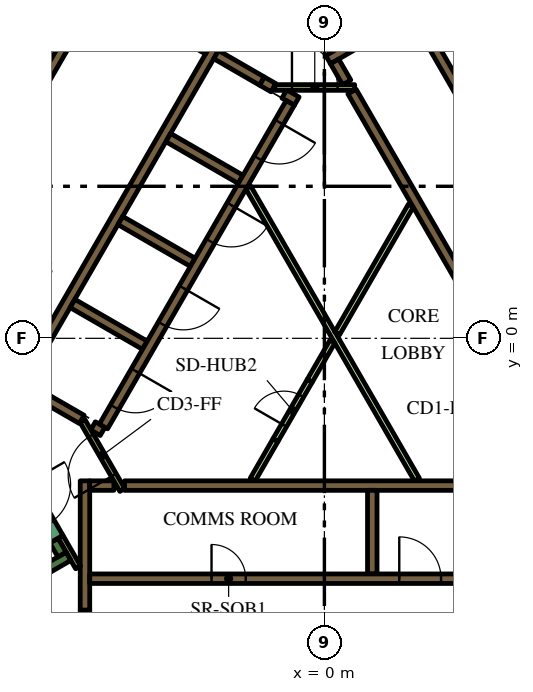
"""IFC4 building model, lengths in metres.
Left out: names, types, materials, properties, quantities, classifications, styles, units other than length and angle.
Written with IfcOpenShell. Run it as: python <this file> out.ifc"""

import sys

from ifc_helpers import new_model, si_unit, direction, frame, frame_2d, origin, place, context, subcontext, project, spatial, polyline, rectangle, outline, extrude, element, fill, save


model = new_model("IFC4")
c1 = context("Model", 3, precision=1e-05, world=origin(), true_north=direction((0.0, 1.0)))
c2 = subcontext(c1, "Body", "Model", "MODEL_VIEW")
j1 = project(units=[si_unit("LENGTHUNIT", "METRE"), si_unit("PLANEANGLEUNIT", "RADIAN")], contexts=[c1])
p1 = place(None, origin())
s1 = spatial("IfcSite", under=j1, at=p1, CompositionType="ELEMENT")
p2 = place(p1, origin())
s2 = spatial("IfcBuilding", under=s1, at=p2, CompositionType="ELEMENT")
p3 = place(p2, frame((0.0, 0.0, 43.2)))
s3 = spatial("IfcBuildingStorey", under=s2, at=p3, CompositionType="ELEMENT", Elevation=43.2)
p4 = place(p3, frame((-15.36, -1.503, 0.0), z_axis=(0.0, 0.0, 1.0), x_axis=(0.50000389221, 0.866023156604, 0.0)))
e1 = element("IfcWall", 1, at=p4, inside=s3, PredefinedType="SOLIDWALL", context=c2, shape_type="SweptSolid", body=[
    extrude(rectangle(XDim=21.0, YDim=0.9, at=frame_2d((10.5, 0.0))), origin(), (0.0, 0.0, 1.0), 3.9),
])
p5 = place(p3, frame((-12.84, -9.261, 0.0), z_axis=(0.0, 0.0, 1.0), x_axis=(0.866016039709, 0.500016218704, 0.0)))
e2 = element("IfcWall", 2, at=p5, inside=s3, PredefinedType="SOLIDWALL", context=c2, shape_type="SweptSolid", body=[
    extrude(rectangle(XDim=7.05, YDim=0.25, at=frame_2d((3.525, 0.0))), origin(), (0.0, 0.0, 1.0), 3.9),
])
p6 = place(p3, frame((-6.905, -5.69, 0.0), z_axis=(0.0, 0.0, 1.0), x_axis=(-0.500402024738, 0.865793170242, 0.0)))
e3 = element("IfcWall", 3, at=p6, inside=s3, PredefinedType="SOLIDWALL", context=c2, shape_type="SweptSolid", body=[
    extrude(rectangle(XDim=0.425, YDim=0.25, at=frame_2d((0.212, 0.0))), origin(), (0.0, 0.0, 1.0), 3.9),
])
p7 = place(p3, frame((-5.259, -3.875, 0.0), z_axis=(0.0, 0.0, 1.0), x_axis=(1.0, 0.0, 0.0)))
e4 = element("IfcWall", 4, at=p7, inside=s3, PredefinedType="SOLIDWALL", context=c2, shape_type="SweptSolid", body=[
    extrude(rectangle(XDim=10.489, YDim=0.25, at=frame_2d((5.244, 0.0))), origin(), (0.0, 0.0, 1.0), 3.9),
])
p8 = place(p3, frame((1.26, -4.0, 0.0), z_axis=(0.0, 0.0, 1.0), x_axis=(0.0, -1.0, 0.0)))
e5 = element("IfcWall", 5, at=p8, inside=s3, PredefinedType="SOLIDWALL", context=c2, shape_type="SweptSolid", body=[
    extrude(rectangle(XDim=2.2, YDim=0.25, at=frame_2d((1.1, 0.0))), origin(), (0.0, 0.0, 1.0), 3.9),
])
p9 = place(p3, frame((-6.3, -3.75, 0.0), z_axis=(0.0, 0.0, 1.0), x_axis=(0.0, -1.0, 0.0)))
e6 = element("IfcWall", 6, at=p9, inside=s3, PredefinedType="SOLIDWALL", context=c2, shape_type="SweptSolid", body=[
    extrude(rectangle(XDim=3.404, YDim=0.25, at=frame_2d((1.702, 0.0))), origin(), (0.0, 0.0, 1.0), 3.9),
])
p10 = place(p3, frame((-6.175, -3.875, 0.0), z_axis=(0.0, 0.0, 1.0), x_axis=(1.0, 0.0, 0.0)))
e7 = element("IfcWall", 7, at=p10, inside=s3, PredefinedType="SOLIDWALL", context=c2, shape_type="SweptSolid", body=[
    extrude(rectangle(XDim=0.637, YDim=0.25, at=frame_2d((0.318, 0.0))), origin(), (0.0, 0.0, 1.0), 3.9),
])
p11 = place(p3, origin())
e8 = element("IfcWall", 8, at=p11, inside=s3, PredefinedType="SOLIDWALL", context=c2, shape_type="SweptSolid", body=[
    extrude(outline(polyline([(2.776, 8.733), (2.499, 8.573), (2.498, 8.573), (2.498, 8.573), (2.282, 8.448), (2.282, 8.448), (0.377, 7.348), (0.16, 7.223), (0.035, 7.439), (3.032, 9.169), (3.03, 9.152), (3.03, 9.133), (3.031, 9.113), (3.035, 9.094), (3.04, 9.075), (3.047, 9.057), (3.056, 9.039), (3.119, 8.931), (2.776, 8.733)])), origin(), (0.0, 0.0, 1.0), 3.9),
])
p12 = place(p3, frame((0.268, 7.285, 0.0), z_axis=(0.0, 0.0, 1.0), x_axis=(0.500098681536, -0.865968422476, 0.0)))
e9 = element("IfcWall", 9, at=p12, inside=s3, PredefinedType="SOLIDWALL", context=c2, shape_type="SweptSolid", body=[
    extrude(rectangle(XDim=0.636, YDim=0.25, at=frame_2d((0.318, 0.0))), origin(), (0.0, 0.0, 1.0), 3.9),
])
p13 = place(p3, frame((5.97, -2.591, 0.0), z_axis=(0.0, 0.0, 1.0), x_axis=(-0.499994469932, 0.866028596547, 0.0)))
e10 = element("IfcWall", 10, at=p13, inside=s3, PredefinedType="SOLIDWALL", context=c2, shape_type="SweptSolid", body=[
    extrude(rectangle(XDim=10.488, YDim=0.25, at=frame_2d((5.244, 0.0))), origin(), (0.0, 0.0, 1.0), 3.9),
])
p14 = place(p3, frame((-8.06, -1.311, 0.0), z_axis=(0.0, 0.0, 1.0), x_axis=(0.50000273126, 0.866023826885, 0.0)))
e11 = element("IfcWall", 11, at=p14, inside=s3, PredefinedType="SOLIDWALL", context=c2, shape_type="SweptSolid", body=[
    extrude(rectangle(XDim=10.33, YDim=0.25, at=frame_2d((5.165, 0.0))), origin(), (0.0, 0.0, 1.0), 3.9),
])
p15 = place(p3, frame((-1.342, 6.595, 0.0), z_axis=(0.0, 0.0, 1.0), x_axis=(-0.866046247233, 0.49996389635, 0.0)))
e12 = element("IfcWall", 12, at=p15, inside=s3, PredefinedType="SOLIDWALL", context=c2, shape_type="SweptSolid", body=[
    extrude(rectangle(XDim=0.35, YDim=0.25, at=frame_2d((0.175, 0.0))), origin(), (0.0, 0.0, 1.0), 3.9),
])
p16 = place(p3, frame((-1.647, 6.771, 0.0), z_axis=(0.0, 0.0, 1.0), x_axis=(-0.865971728693, 0.500092956464, 0.0)))
e13 = element("IfcWall", 13, at=p16, inside=s3, PredefinedType="SOLIDWALL", context=c2, shape_type="SweptSolid", body=[
    extrude(rectangle(XDim=1.388, YDim=0.25, at=frame_2d((0.694, 0.0))), origin(), (0.0, 0.0, 1.0), 3.9),
])
p17 = place(p3, frame((-0.728, 6.24, 0.0), z_axis=(0.0, 0.0, 1.0), x_axis=(-0.866088799389, 0.499890179513, 0.0)))
e14 = element("IfcWall", 14, at=p17, inside=s3, PredefinedType="SOLIDWALL", context=c2, shape_type="SweptSolid", body=[
    extrude(rectangle(XDim=0.378, YDim=0.25, at=frame_2d((0.189, 0.0))), origin(), (0.0, 0.0, 1.0), 3.9),
])
for number, where, z_axis, x_axis in (
    (15, (-2.204, 4.182, 0.0), (0.0, 0.0, 1.0), (-0.866, 0.5, 0.0)),
    (16, (-5.369, 3.1, 0.0), (0.0, 0.0, 1.0), (0.866, -0.5, 0.0)),
    (17, (-4.724, -0.182, 0.0), (0.0, 0.0, 1.0), (-0.866, 0.5, 0.0)),
):
    element("IfcWall", number, at=place(p3, frame(where, z_axis=z_axis, x_axis=x_axis)), inside=s3, PredefinedType="SOLIDWALL", context=c2, shape_type="SweptSolid", body=[
        extrude(rectangle(XDim=2.2, YDim=0.25, at=frame_2d((1.1, 0.0))), origin(), (0.0, 0.0, 1.0), 3.9),
    ])
p18 = place(p3, frame((-6.088, -2.305, 0.0), z_axis=(0.0, 0.0, 1.0), x_axis=(0.866059450854, -0.499941024108, 0.0)))
e18 = element("IfcWall", 18, at=p18, inside=s3, PredefinedType="SOLIDWALL", context=c2, shape_type="SweptSolid", body=[
    extrude(rectangle(XDim=0.29, YDim=0.25, at=frame_2d((0.145, 0.0))), origin(), (0.0, 0.0, 1.0), 3.9),
])
p19 = place(p3, frame((-7.889, -1.265, 0.0), z_axis=(0.0, 0.0, 1.0), x_axis=(0.865986741702, -0.500066958712, 0.0)))
e19 = element("IfcWall", 19, at=p19, inside=s3, PredefinedType="SOLIDWALL", context=c2, shape_type="SweptSolid", body=[
    extrude(rectangle(XDim=1.738, YDim=0.25, at=frame_2d((0.869, 0.0))), origin(), (0.0, 0.0, 1.0), 3.9),
])
e20 = element("IfcWall", 20, at=p11, inside=s3, PredefinedType="SOLIDWALL", context=c2, shape_type="SweptSolid", body=[
    extrude(outline(polyline([(-3.128, 7.481), (-3.259, 7.557), (-3.134, 7.773), (-3.003, 7.698), (-3.128, 7.481)])), origin(), (0.0, 0.0, 1.0), 3.9),
])
p20 = place(p3, frame((-6.48, -6.027, 0.0), z_axis=(0.0, 0.0, 1.0), x_axis=(-0.499927229454, 0.866067413802, 0.0)))
e21 = element("IfcWall", 21, at=p20, inside=s3, PredefinedType="PARTITIONING", context=c2, shape_type="SweptSolid", body=[
    extrude(rectangle(XDim=0.929, YDim=0.15, at=frame_2d((0.464, 0.0))), origin(), (0.0, 0.0, 1.0), 3.9),
])
p21 = place(p3, frame((-1.887, -3.718, 0.0), z_axis=(0.0, 0.0, 1.0), x_axis=(0.500057179532, 0.865992388649, 0.0)))
e22 = element("IfcWall", 22, at=p21, inside=s3, PredefinedType="PARTITIONING", context=c2, shape_type="SweptSolid", body=[
    extrude(rectangle(XDim=1.199, YDim=0.15, at=frame_2d((0.6, 0.0))), origin(), (0.0, 0.0, 1.0), 2.75),
])
p22 = place(p3, frame((2.435, -3.718, 0.0), z_axis=(0.0, 0.0, 1.0), x_axis=(-0.499985176046, 0.866033962229, 0.0)))
e23 = element("IfcWall", 23, at=p22, inside=s3, PredefinedType="PARTITIONING", context=c2, shape_type="SweptSolid", body=[
    extrude(rectangle(XDim=8.875, YDim=0.15, at=frame_2d((4.438, 0.0))), origin(), (0.0, 0.0, 1.0), 2.75),
])
p23 = place(p3, frame((0.336, 0.132, 0.0), z_axis=(0.0, 0.0, 1.0), x_axis=(0.500001957507, 0.866024273614, 0.0)))
e24 = element("IfcWall", 24, at=p23, inside=s3, PredefinedType="PARTITIONING", context=c2, shape_type="SweptSolid", body=[
    extrude(rectangle(XDim=3.881, YDim=0.15, at=frame_2d((1.941, 0.0))), origin(), (0.0, 0.0, 1.0), 2.75),
])
p24 = place(p3, frame((-0.387, -1.121, 0.0), z_axis=(0.0, 0.0, 1.0), x_axis=(0.500057179532, 0.865992388649, 0.0)))
e25 = element("IfcWall", 25, at=p24, inside=s3, PredefinedType="PARTITIONING", context=c2, shape_type="SweptSolid", body=[
    extrude(rectangle(XDim=1.199, YDim=0.15, at=frame_2d((0.6, 0.0))), origin(), (0.0, 0.0, 1.0), 2.75),
])
p25 = place(p3, frame((-6.175, -6.325, 0.0), z_axis=(0.0, 0.0, 1.0), x_axis=(1.0, 0.0, 0.0)))
e26 = element("IfcWall", 26, at=p25, inside=s3, PredefinedType="SOLIDWALL", context=c2, shape_type="SweptSolid", body=[
    extrude(rectangle(XDim=12.35, YDim=0.25, at=frame_2d((6.175, 0.0))), origin(), (0.0, 0.0, 1.0), 3.9),
])
p26 = place(p25, frame((3.205, 0.0, 0.0)))
e27 = element("IfcOpeningElement", 27, at=p26, cuts=e26, PredefinedType="OPENING", context=c2, shape_type="SweptSolid", body=[
    extrude(rectangle(XDim=0.9, YDim=2.1, at=frame_2d((0.45, 1.05))), frame((0.0, 0.135, 0.0), z_axis=(0.0, -1.0, 0.0), x_axis=(1.0, 0.0, 0.0)), (0.0, 0.0, 1.0), 0.27),
])
p27 = place(p25, frame((8.145, 0.0, 0.0)))
e28 = element("IfcOpeningElement", 28, at=p27, cuts=e26, PredefinedType="OPENING", context=c2, shape_type="SweptSolid", body=[
    extrude(rectangle(XDim=1.1, YDim=2.1, at=frame_2d((0.55, 1.05))), frame((0.0, 0.135, 0.0), z_axis=(0.0, -1.0, 0.0), x_axis=(1.0, 0.0, 0.0)), (0.0, 0.0, 1.0), 0.27),
])
p28 = place(p25, frame((10.665, 0.0, 0.0)))
e29 = element("IfcOpeningElement", 29, at=p28, cuts=e26, PredefinedType="OPENING", context=c2, shape_type="SweptSolid", body=[
    extrude(rectangle(XDim=1.1, YDim=2.1, at=frame_2d((0.55, 1.05))), frame((0.0, 0.135, 0.0), z_axis=(0.0, -1.0, 0.0), x_axis=(1.0, 0.0, 0.0)), (0.0, 0.0, 1.0), 0.27),
])
p29 = place(p3, frame((8.565, -2.185, 0.0), z_axis=(0.0, 0.0, 1.0), x_axis=(-0.499997954832, 0.866026584559, 0.0)))
e30 = element("IfcWall", 30, at=p29, inside=s3, PredefinedType="SOLIDWALL", context=c2, shape_type="SweptSolid", body=[
    extrude(rectangle(XDim=12.35, YDim=0.25, at=frame_2d((6.175, 0.0))), origin(), (0.0, 0.0, 1.0), 3.9),
])
p30 = place(p29, frame((5.725, 0.0, 0.0)))
e31 = element("IfcOpeningElement", 31, at=p30, cuts=e30, PredefinedType="OPENING", context=c2, shape_type="SweptSolid", body=[
    extrude(rectangle(XDim=0.9, YDim=2.1, at=frame_2d((0.45, 1.05))), frame((0.0, 0.135, 0.0), z_axis=(0.0, -1.0, 0.0), x_axis=(1.0, 0.0, 0.0)), (0.0, 0.0, 1.0), 0.27),
])
p31 = place(p3, frame((-6.008, 9.144, 0.0), z_axis=(0.0, 0.0, 1.0), x_axis=(-0.500006956611, -0.866021387346, 0.0)))
e32 = element("IfcWall", 32, at=p31, inside=s3, PredefinedType="SOLIDWALL", context=c2, shape_type="SweptSolid", body=[
    extrude(rectangle(XDim=9.83, YDim=0.25, at=frame_2d((4.915, 0.0))), origin(), (0.0, 0.0, 1.0), 3.9),
])
p32 = place(p31, frame((6.985, 0.0, 0.0)))
e33 = element("IfcOpeningElement", 33, at=p32, cuts=e32, PredefinedType="OPENING", context=c2, shape_type="SweptSolid", body=[
    extrude(rectangle(XDim=0.9, YDim=2.1, at=frame_2d((0.45, 1.05))), frame((0.0, 0.135, 0.0), z_axis=(0.0, -1.0, 0.0), x_axis=(1.0, 0.0, 0.0)), (0.0, 0.0, 1.0), 0.27),
])
p33 = place(p3, frame((-0.898, 6.194, 0.0), z_axis=(0.0, 0.0, 1.0), x_axis=(-0.499996202215, -0.866027596426, 0.0)))
e34 = element("IfcWall", 34, at=p33, inside=s3, PredefinedType="SOLIDWALL", context=c2, shape_type="SweptSolid", body=[
    extrude(rectangle(XDim=9.83, YDim=0.25, at=frame_2d((4.915, 0.0))), origin(), (0.0, 0.0, 1.0), 3.9),
])
p34 = place(p33, frame((0.585, 0.0, 0.0)))
e35 = element("IfcOpeningElement", 35, at=p34, cuts=e34, PredefinedType="OPENING", context=c2, shape_type="SweptSolid", body=[
    extrude(rectangle(XDim=1.1, YDim=2.1, at=frame_2d((0.55, 1.05))), frame((0.0, 0.135, 0.0), z_axis=(0.0, -1.0, 0.0), x_axis=(1.0, 0.0, 0.0)), (0.0, 0.0, 1.0), 0.27),
])
p35 = place(p33, frame((3.105, 0.0, 0.0)))
e36 = element("IfcOpeningElement", 36, at=p35, cuts=e34, PredefinedType="OPENING", context=c2, shape_type="SweptSolid", body=[
    extrude(rectangle(XDim=1.1, YDim=2.1, at=frame_2d((0.55, 1.05))), frame((0.0, 0.135, 0.0), z_axis=(0.0, -1.0, 0.0), x_axis=(1.0, 0.0, 0.0)), (0.0, 0.0, 1.0), 0.27),
])
p36 = place(p33, frame((5.625, 0.0, 0.0)))
e37 = element("IfcOpeningElement", 37, at=p36, cuts=e34, PredefinedType="OPENING", context=c2, shape_type="SweptSolid", body=[
    extrude(rectangle(XDim=1.1, YDim=2.1, at=frame_2d((0.55, 1.05))), frame((0.0, 0.135, 0.0), z_axis=(0.0, -1.0, 0.0), x_axis=(1.0, 0.0, 0.0)), (0.0, 0.0, 1.0), 0.27),
])
p37 = place(p33, frame((8.145, 0.0, 0.0)))
e38 = element("IfcOpeningElement", 38, at=p37, cuts=e34, PredefinedType="OPENING", context=c2, shape_type="SweptSolid", body=[
    extrude(rectangle(XDim=1.1, YDim=2.1, at=frame_2d((0.55, 1.05))), frame((0.0, 0.135, 0.0), z_axis=(0.0, -1.0, 0.0), x_axis=(1.0, 0.0, 0.0)), (0.0, 0.0, 1.0), 0.27),
])
p38 = place(p3, frame((-8.103, -3.466, 0.0), z_axis=(0.0, 0.0, 1.0), x_axis=(0.500078061341, -0.865980330357, 0.0)))
e39 = element("IfcWall", 39, at=p38, inside=s3, PredefinedType="SOLIDWALL", context=c2, shape_type="SweptSolid", body=[
    extrude(rectangle(XDim=2.1, YDim=0.4, at=frame_2d((1.05, 0.0))), origin(), (0.0, 0.0, 1.0), 3.9),
])
p39 = place(p38, frame((0.45, 0.0, 0.0)))
e40 = element("IfcOpeningElement", 40, at=p39, cuts=e39, PredefinedType="OPENING", context=c2, shape_type="SweptSolid", body=[
    extrude(rectangle(XDim=1.2, YDim=2.1, at=frame_2d((0.6, 1.05))), frame((0.0, 0.21, 0.0), z_axis=(0.0, -1.0, 0.0), x_axis=(1.0, 0.0, 0.0)), (0.0, 0.0, 1.0), 0.42),
])
p40 = place(p3, frame((-6.3, -7.154, 0.0), z_axis=(0.0, 0.0, 1.0), x_axis=(0.0, -1.0, 0.0)))
e41 = element("IfcWall", 41, at=p40, inside=s3, PredefinedType="SOLIDWALL", context=c2, shape_type="SweptSolid", body=[
    extrude(rectangle(XDim=1.8, YDim=0.25, at=frame_2d((0.9, 0.0))), origin(), (0.0, 0.0, 1.0), 3.9),
])
p41 = place(p40, frame((0.45, 0.0, 0.0)))
e42 = element("IfcOpeningElement", 42, at=p41, cuts=e41, PredefinedType="OPENING", context=c2, shape_type="SweptSolid", body=[
    extrude(rectangle(XDim=0.9, YDim=2.1, at=frame_2d((0.45, 1.05))), frame((0.0, 0.135, 0.0), z_axis=(0.0, -1.0, 0.0), x_axis=(1.0, 0.0, 0.0)), (0.0, 0.0, 1.0), 0.27),
])
p42 = place(p3, frame((-1.303, 6.6, 0.0), z_axis=(0.0, 0.0, 1.0), x_axis=(1.0, 0.0, 0.0)))
e43 = element("IfcWall", 43, at=p42, inside=s3, PredefinedType="PARTITIONING", context=c2, shape_type="SweptSolid", body=[
    extrude(rectangle(XDim=2.1, YDim=0.15, at=frame_2d((1.05, 0.0))), origin(), (0.0, 0.0, 1.0), 3.9),
])
p43 = place(p42, frame((0.45, 0.0, 0.0)))
e44 = element("IfcOpeningElement", 44, at=p43, cuts=e43, PredefinedType="OPENING", context=c2, shape_type="SweptSolid", body=[
    extrude(rectangle(XDim=1.2, YDim=2.1, at=frame_2d((0.6, 1.05))), frame((0.0, 0.085, 0.0), z_axis=(0.0, -1.0, 0.0), x_axis=(1.0, 0.0, 0.0)), (0.0, 0.0, 1.0), 0.17),
])
p44 = place(p3, frame((-5.317, -3.99, 0.0), z_axis=(0.0, 0.0, 1.0), x_axis=(-0.500027713859, 0.866009402589, 0.0)))
e45 = element("IfcWall", 45, at=p44, inside=s3, PredefinedType="PARTITIONING", context=c2, shape_type="SweptSolid", body=[
    extrude(rectangle(XDim=2.1, YDim=0.15, at=frame_2d((1.05, 0.0))), origin(), (0.0, 0.0, 1.0), 3.9),
])
p45 = place(p44, frame((0.45, 0.0, 0.0)))
e46 = element("IfcOpeningElement", 46, at=p45, cuts=e45, PredefinedType="OPENING", context=c2, shape_type="SweptSolid", body=[
    extrude(rectangle(XDim=1.2, YDim=2.1, at=frame_2d((0.6, 1.05))), frame((0.0, 0.085, 0.0), z_axis=(0.0, -1.0, 0.0), x_axis=(1.0, 0.0, 0.0)), (0.0, 0.0, 1.0), 0.17),
])
p46 = place(p3, frame((-1.287, -2.679, 0.0), z_axis=(0.0, 0.0, 1.0), x_axis=(0.499961193289, 0.866047807691, 0.0)))
e47 = element("IfcWall", 47, at=p46, inside=s3, PredefinedType="PARTITIONING", context=c2, shape_type="SweptSolid", body=[
    extrude(rectangle(XDim=1.8, YDim=0.15, at=frame_2d((0.9, 0.0))), origin(), (0.0, 0.0, 1.0), 2.75),
])
p47 = place(p46, frame((0.45, 0.0, 0.0)))
e48 = element("IfcOpeningElement", 48, at=p47, cuts=e47, PredefinedType="OPENING", context=c2, shape_type="SweptSolid", body=[
    extrude(rectangle(XDim=0.9, YDim=2.1, at=frame_2d((0.45, 1.05))), frame((0.0, 0.085, 0.0), z_axis=(0.0, -1.0, 0.0), x_axis=(1.0, 0.0, 0.0)), (0.0, 0.0, 1.0), 0.17),
])
p48 = place(p3, frame((-19.081, -3.9, 0.0), z_axis=(0.0, 0.0, 1.0), x_axis=(0.499998313975, 0.866026377209, 0.0)))
e49 = element("IfcWall", 49, at=p48, inside=s3, PredefinedType="PARTITIONING", context=c2, shape_type="SweptSolid", body=[
    extrude(rectangle(XDim=25.766, YDim=0.15, at=frame_2d((12.883, 0.0))), origin(), (0.0, 0.0, 1.0), 2.75),
])
p49 = place(p48, frame((16.196, 0.0, 0.0)))
e50 = element("IfcOpeningElement", 50, at=p49, cuts=e49, PredefinedType="OPENING", context=c2, shape_type="SweptSolid", body=[
    extrude(rectangle(XDim=1.0, YDim=2.1, at=frame_2d((0.5, 1.05))), frame((0.0, 0.085, 0.0), z_axis=(0.0, -1.0, 0.0), x_axis=(1.0, 0.0, 0.0)), (0.0, 0.0, 1.0), 0.17),
])
p50 = place(p48, frame((14.889, 0.0, 0.0)))
e51 = element("IfcOpeningElement", 51, at=p50, cuts=e49, PredefinedType="OPENING", context=c2, shape_type="SweptSolid", body=[
    extrude(rectangle(XDim=1.0, YDim=2.1, at=frame_2d((0.5, 1.05))), frame((0.0, 0.085, 0.0), z_axis=(0.0, -1.0, 0.0), x_axis=(1.0, 0.0, 0.0)), (0.0, 0.0, 1.0), 0.17),
])
p51 = place(p48, frame((3.698, 0.0, 0.0)))
e52 = element("IfcOpeningElement", 52, at=p51, cuts=e49, PredefinedType="OPENING", context=c2, shape_type="SweptSolid", body=[
    extrude(rectangle(XDim=1.1, YDim=2.1, at=frame_2d((0.55, 1.05))), frame((0.0, 0.085, 0.0), z_axis=(0.0, -1.0, 0.0), x_axis=(1.0, 0.0, 0.0)), (0.0, 0.0, 1.0), 0.17),
])
p52 = place(p48, frame((2.392, 0.0, 0.0)))
e53 = element("IfcOpeningElement", 53, at=p52, cuts=e49, PredefinedType="OPENING", context=c2, shape_type="SweptSolid", body=[
    extrude(rectangle(XDim=1.0, YDim=2.1, at=frame_2d((0.5, 1.05))), frame((0.0, 0.085, 0.0), z_axis=(0.0, -1.0, 0.0), x_axis=(1.0, 0.0, 0.0)), (0.0, 0.0, 1.0), 0.17),
])
p53 = place(p26, origin())
e54 = element("IfcDoor", 54, at=p53, inside=s3, OperationType="SINGLE_SWING_LEFT", PredefinedType="DOOR", context=c2, shape_type="SweptSolid", body=[
    extrude(rectangle(XDim=0.9, YDim=2.1, at=frame_2d((0.45, 1.05))), frame((0.0, 0.025, 0.0), z_axis=(0.0, -1.0, 0.0), x_axis=(1.0, 0.0, 0.0)), (0.0, 0.0, 1.0), 0.05),
])
fill(e27, e54)
p54 = place(p27, origin())
e55 = element("IfcDoor", 55, at=p54, inside=s3, OperationType="DOUBLE_DOOR_SLIDING", PredefinedType="DOOR", context=c2, shape_type="SweptSolid", body=[
    extrude(rectangle(XDim=1.1, YDim=2.1, at=frame_2d((0.55, 1.05))), frame((0.0, 0.025, 0.0), z_axis=(0.0, -1.0, 0.0), x_axis=(1.0, 0.0, 0.0)), (0.0, 0.0, 1.0), 0.05),
])
fill(e28, e55)
p55 = place(p34, origin())
e56 = element("IfcDoor", 56, at=p55, inside=s3, OperationType="DOUBLE_DOOR_SLIDING", PredefinedType="DOOR", context=c2, shape_type="SweptSolid", body=[
    extrude(rectangle(XDim=1.1, YDim=2.1, at=frame_2d((0.55, 1.05))), frame((0.0, 0.025, 0.0), z_axis=(0.0, -1.0, 0.0), x_axis=(1.0, 0.0, 0.0)), (0.0, 0.0, 1.0), 0.05),
])
fill(e35, e56)
p56 = place(p35, origin())
e57 = element("IfcDoor", 57, at=p56, inside=s3, OperationType="DOUBLE_DOOR_SLIDING", PredefinedType="DOOR", context=c2, shape_type="SweptSolid", body=[
    extrude(rectangle(XDim=1.1, YDim=2.1, at=frame_2d((0.55, 1.05))), frame((0.0, 0.025, 0.0), z_axis=(0.0, -1.0, 0.0), x_axis=(1.0, 0.0, 0.0)), (0.0, 0.0, 1.0), 0.05),
])
fill(e36, e57)
p57 = place(p36, origin())
e58 = element("IfcDoor", 58, at=p57, inside=s3, OperationType="DOUBLE_DOOR_SLIDING", PredefinedType="DOOR", context=c2, shape_type="SweptSolid", body=[
    extrude(rectangle(XDim=1.1, YDim=2.1, at=frame_2d((0.55, 1.05))), frame((0.0, 0.025, 0.0), z_axis=(0.0, -1.0, 0.0), x_axis=(1.0, 0.0, 0.0)), (0.0, 0.0, 1.0), 0.05),
])
fill(e37, e58)
p58 = place(p37, origin())
e59 = element("IfcDoor", 59, at=p58, inside=s3, OperationType="DOUBLE_DOOR_SLIDING", PredefinedType="DOOR", context=c2, shape_type="SweptSolid", body=[
    extrude(rectangle(XDim=1.1, YDim=2.1, at=frame_2d((0.55, 1.05))), frame((0.0, 0.025, 0.0), z_axis=(0.0, -1.0, 0.0), x_axis=(1.0, 0.0, 0.0)), (0.0, 0.0, 1.0), 0.05),
])
fill(e38, e59)
p59 = place(p43, origin())
e60 = element("IfcDoor", 60, at=p59, inside=s3, OperationType="SINGLE_SWING_LEFT", PredefinedType="DOOR", context=c2, shape_type="SweptSolid", body=[
    extrude(rectangle(XDim=1.2, YDim=2.1, at=frame_2d((0.6, 1.05))), frame((0.0, 0.025, 0.0), z_axis=(0.0, -1.0, 0.0), x_axis=(1.0, 0.0, 0.0)), (0.0, 0.0, 1.0), 0.05),
])
fill(e44, e60)
p60 = place(p45, origin())
e61 = element("IfcDoor", 61, at=p60, inside=s3, OperationType="SINGLE_SWING_LEFT", PredefinedType="DOOR", context=c2, shape_type="SweptSolid", body=[
    extrude(rectangle(XDim=1.2, YDim=2.1, at=frame_2d((0.6, 1.05))), frame((0.0, 0.025, 0.0), z_axis=(0.0, -1.0, 0.0), x_axis=(1.0, 0.0, 0.0)), (0.0, 0.0, 1.0), 0.05),
])
fill(e46, e61)
p61 = place(p47, origin())
e62 = element("IfcDoor", 62, at=p61, inside=s3, OperationType="SINGLE_SWING_LEFT", PredefinedType="DOOR", context=c2, shape_type="SweptSolid", body=[
    extrude(rectangle(XDim=0.9, YDim=2.1, at=frame_2d((0.45, 1.05))), frame((0.0, 0.025, 0.0), z_axis=(0.0, -1.0, 0.0), x_axis=(1.0, 0.0, 0.0)), (0.0, 0.0, 1.0), 0.05),
])
fill(e48, e62)
save(model, sys.argv[1])
